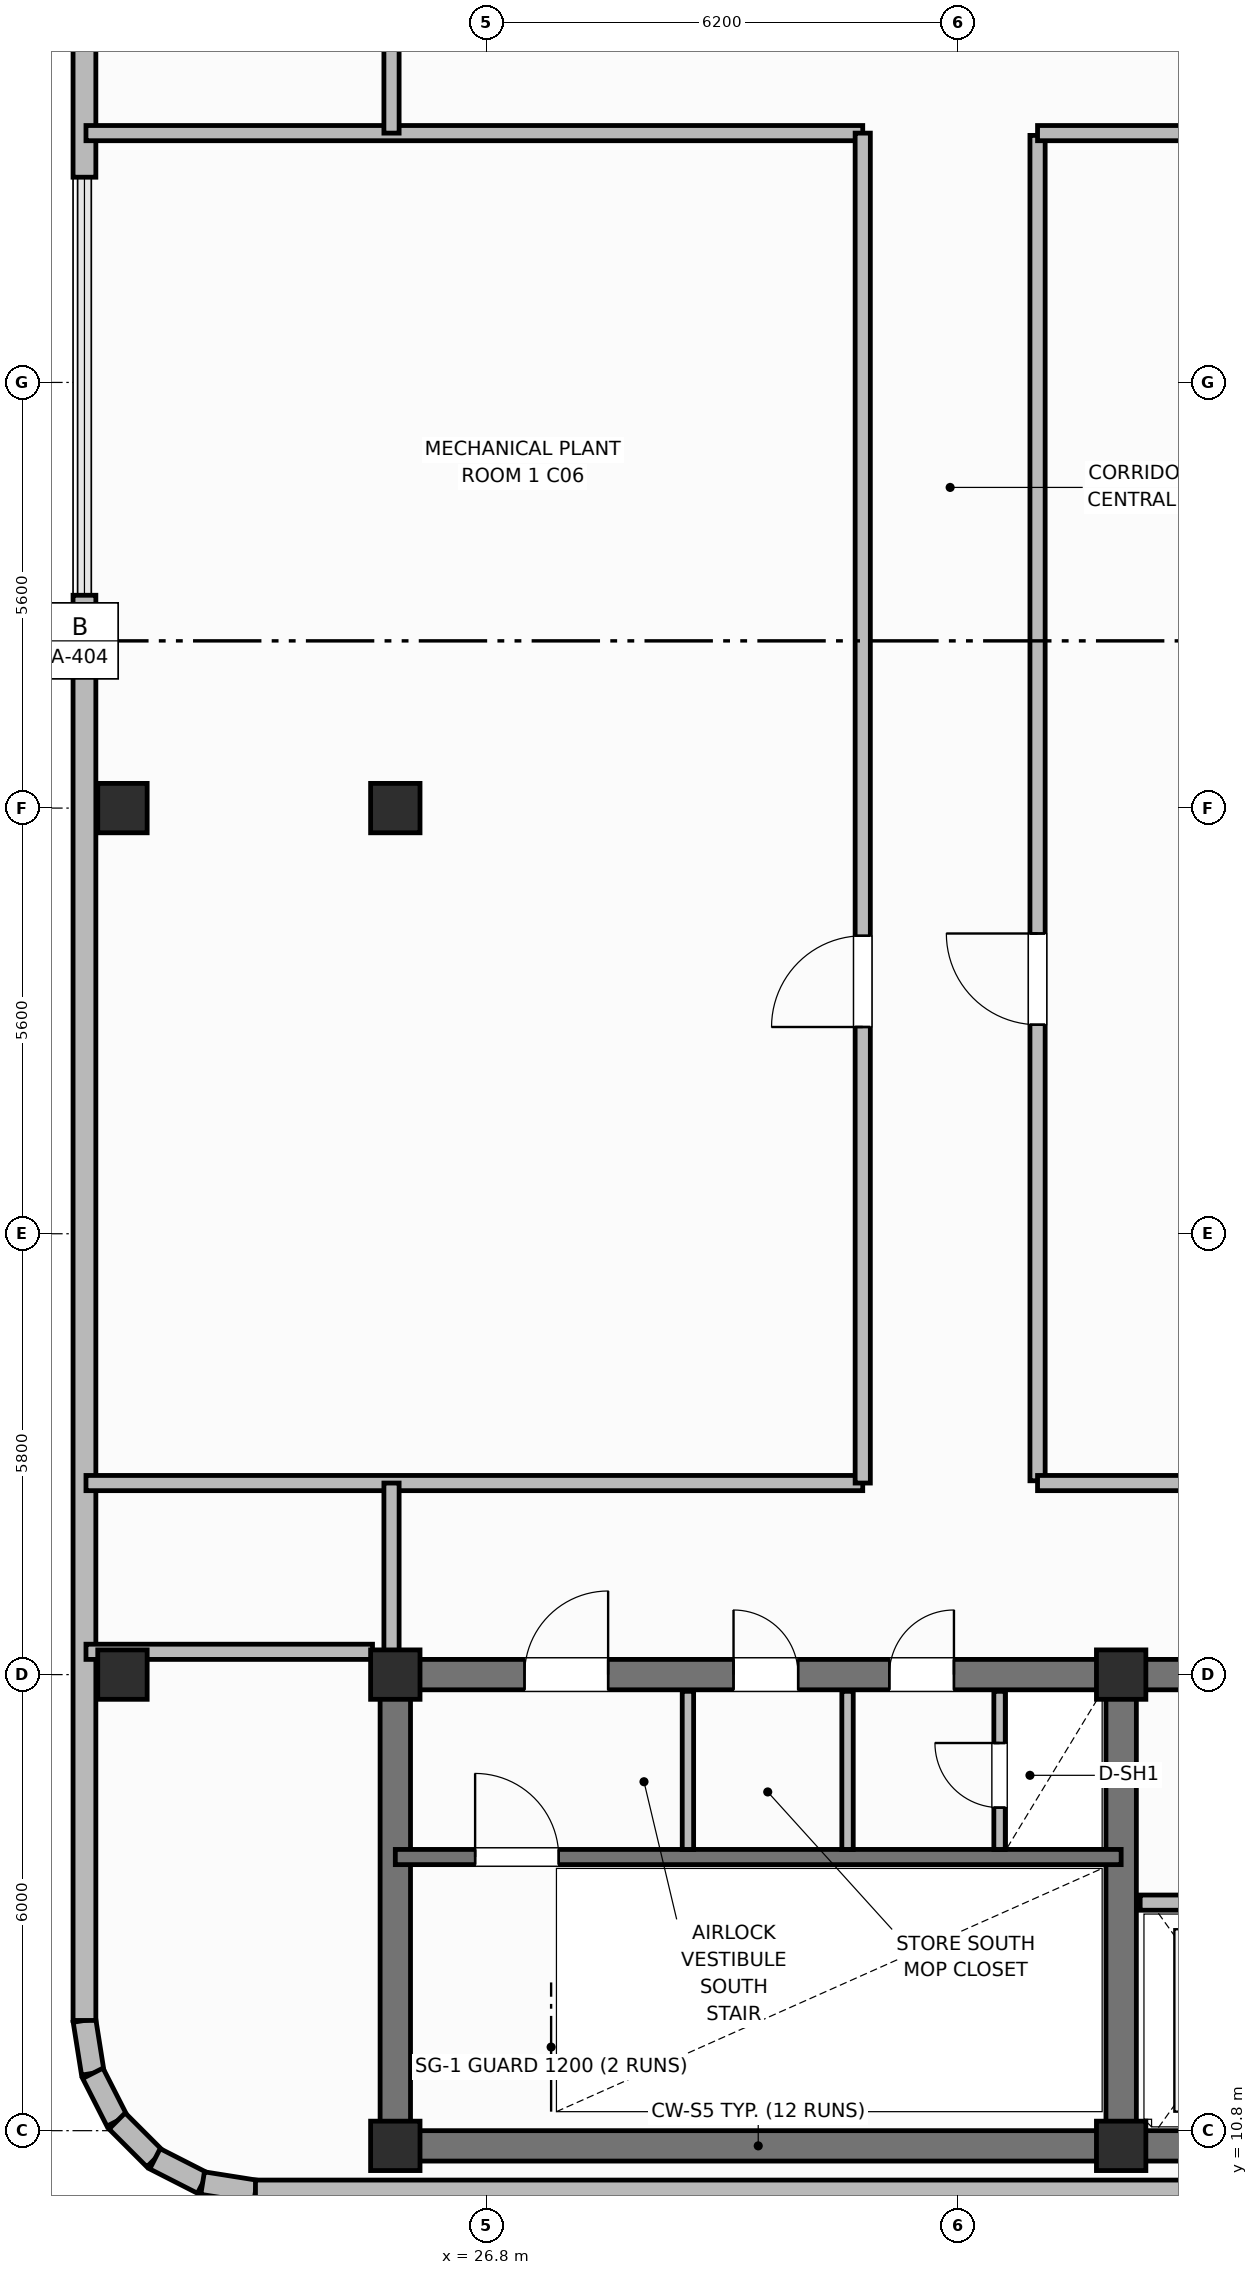
"""IFC4 building model, lengths in metres.
Left out: names, types, materials, properties, quantities, classifications, styles, units other than length and angle.
Written with IfcOpenShell. Run it as: python <this file> out.ifc"""

import sys

from ifc_helpers import new_model, si_unit, direction, frame, frame_2d, origin, origin_2d, place, context, subcontext, project, spatial, rectangle, extrude, element, fill, save


model = new_model("IFC4")
c1 = context("Model", 3, precision=1e-05, world=origin(), true_north=direction((0.0, 1.0)))
c2 = subcontext(c1, "Body", "Model", "MODEL_VIEW")
j1 = project(units=[si_unit("LENGTHUNIT", "METRE"), si_unit("PLANEANGLEUNIT", "RADIAN")], contexts=[c1])
p1 = place(None, origin())
s1 = spatial("IfcSite", under=j1, at=p1, CompositionType="ELEMENT")
p2 = place(p1, origin())
s2 = spatial("IfcBuilding", under=s1, at=p2, CompositionType="ELEMENT")
p3 = place(p2, frame((0.0, 0.0, 320.0)))
s3 = spatial("IfcBuildingStorey", under=s2, at=p3, CompositionType="ELEMENT", Elevation=320.0)
p4 = place(p3, frame((52.8, 10.6, 0.0), z_axis=(0.0, 0.0, 1.0), x_axis=(-1.0, 0.0, 0.0)))
e1 = element("IfcWall", 1, at=p4, inside=s3, PredefinedType="SHEAR", context=c2, shape_type="SweptSolid", body=[
    extrude(rectangle(XDim=27.2, YDim=0.4, at=frame_2d((13.6, 0.0))), origin(), (0.0, 0.0, 1.0), 3.6),
])
p5 = place(p3, frame((25.6, 10.8, 0.0), z_axis=(0.0, 0.0, 1.0), x_axis=(0.0, 1.0, 0.0)))
e2 = element("IfcWall", 2, at=p5, inside=s3, PredefinedType="SHEAR", context=c2, shape_type="SweptSolid", body=[
    extrude(rectangle(XDim=5.8, YDim=0.4, at=frame_2d((2.9, 0.0))), origin(), (0.0, 0.0, 1.0), 3.6),
])
p6 = place(p3, frame((25.6, 16.8, 0.0), z_axis=(0.0, 0.0, 1.0), x_axis=(1.0, 0.0, 0.0)))
e3 = element("IfcWall", 3, at=p6, inside=s3, PredefinedType="SHEAR", context=c2, shape_type="SweptSolid", body=[
    extrude(rectangle(XDim=27.2, YDim=0.4, at=frame_2d((13.6, 0.0))), origin(), (0.0, 0.0, 1.0), 3.6),
])
p7 = place(p6, frame((1.7, 0.0, 0.0)))
e4 = element("IfcOpeningElement", 4, at=p7, cuts=e3, PredefinedType="OPENING", context=c2, shape_type="SweptSolid", body=[
    extrude(rectangle(XDim=1.1, YDim=2.15, at=frame_2d((0.55, 1.075))), frame((0.0, 0.21, 0.0), z_axis=(0.0, -1.0, 0.0), x_axis=(1.0, 0.0, 0.0)), (0.0, 0.0, 1.0), 0.42),
])
p8 = place(p6, frame((4.45, 0.0, 0.0)))
e5 = element("IfcOpeningElement", 5, at=p8, cuts=e3, PredefinedType="OPENING", context=c2, shape_type="SweptSolid", body=[
    extrude(rectangle(XDim=0.85, YDim=2.1, at=frame_2d((0.425, 1.05))), frame((0.0, 0.21, 0.0), z_axis=(0.0, -1.0, 0.0), x_axis=(1.0, 0.0, 0.0)), (0.0, 0.0, 1.0), 0.42),
])
p9 = place(p6, frame((6.5, 0.0, 0.0)))
e6 = element("IfcOpeningElement", 6, at=p9, cuts=e3, PredefinedType="OPENING", context=c2, shape_type="SweptSolid", body=[
    extrude(rectangle(XDim=0.85, YDim=2.1, at=frame_2d((0.425, 1.05))), frame((0.0, 0.21, 0.0), z_axis=(0.0, -1.0, 0.0), x_axis=(1.0, 0.0, 0.0)), (0.0, 0.0, 1.0), 0.42),
])
p10 = place(p6, frame((13.0, 0.0, 0.0)))
e7 = element("IfcOpeningElement", 7, at=p10, cuts=e3, PredefinedType="OPENING", context=c2, shape_type="SweptSolid", body=[
    extrude(rectangle(XDim=1.2, YDim=2.15, at=frame_2d((0.6, 1.075))), frame((0.0, 0.21, 0.0), z_axis=(0.0, -1.0, 0.0), x_axis=(1.0, 0.0, 0.0)), (0.0, 0.0, 1.0), 0.42),
])
p11 = place(p6, frame((19.8, 0.0, 0.0)))
e8 = element("IfcOpeningElement", 8, at=p11, cuts=e3, PredefinedType="OPENING", context=c2, shape_type="SweptSolid", body=[
    extrude(rectangle(XDim=0.85, YDim=2.1, at=frame_2d((0.425, 1.05))), frame((0.0, 0.21, 0.0), z_axis=(0.0, -1.0, 0.0), x_axis=(1.0, 0.0, 0.0)), (0.0, 0.0, 1.0), 0.42),
])
p12 = place(p6, frame((24.2, 0.0, 0.0)))
e9 = element("IfcOpeningElement", 9, at=p12, cuts=e3, PredefinedType="OPENING", context=c2, shape_type="SweptSolid", body=[
    extrude(rectangle(XDim=0.85, YDim=2.1, at=frame_2d((0.425, 1.05))), frame((0.0, 0.21, 0.0), z_axis=(0.0, -1.0, 0.0), x_axis=(1.0, 0.0, 0.0)), (0.0, 0.0, 1.0), 0.42),
])
p13 = place(p3, frame((35.15, 10.8, 0.0), z_axis=(0.0, 0.0, 1.0), x_axis=(0.0, 1.0, 0.0)))
e10 = element("IfcWall", 10, at=p13, inside=s3, PredefinedType="SHEAR", context=c2, shape_type="SweptSolid", body=[
    extrude(rectangle(XDim=5.8, YDim=0.4, at=frame_2d((2.9, 0.0))), origin(), (0.0, 0.0, 1.0), 3.6),
])
for number, where, z_axis, x_axis in (
    (11, (25.6, 10.6, 0.0), (0.0, 0.0, 1.0), (1.0, 0.0, 0.0)),
    (12, (25.6, 16.8, 0.0), (0.0, 0.0, 1.0), (1.0, 0.0, 0.0)),
    (13, (35.15, 10.6, 0.0), (0.0, 0.0, 1.0), (1.0, 0.0, 0.0)),
    (14, (35.15, 16.8, 0.0), (0.0, 0.0, 1.0), (1.0, 0.0, 0.0)),
    (15, (25.6, 28.2, 0.0), (0.0, 0.0, 1.0), (1.0, 0.0, 0.0)),
    (16, (22.01, 16.8, 0.0), (0.0, 0.0, 1.0), (1.0, 0.0, 0.0)),
    (17, (22.01, 28.2, 0.0), (0.0, 0.0, 1.0), (1.0, 0.0, 0.0)),
):
    element("IfcColumn", number, at=place(p3, frame(where, z_axis=z_axis, x_axis=x_axis)), inside=s3, PredefinedType="COLUMN", context=c2, shape_type="SweptSolid", body=[
        extrude(rectangle(XDim=0.65, YDim=0.65, at=origin_2d()), origin(), (0.0, 0.0, 1.0), 3.6),
    ])
for number, where, z_axis, x_axis in (
    (18, (21.51, 12.25, 0.0), (0.0, 0.0, 1.0), (0.156, -0.988, 0.0)),
    (19, (21.62, 11.555, 0.0), (0.0, 0.0, 1.0), (0.454, -0.891, 0.0)),
):
    element("IfcWall", number, at=place(p3, frame(where, z_axis=z_axis, x_axis=x_axis)), inside=s3, PredefinedType="SOLIDWALL", context=c2, shape_type="SweptSolid", body=[
        extrude(rectangle(XDim=0.704, YDim=0.3, at=frame_2d((0.352, 0.0))), origin(), (0.0, 0.0, 1.0), 2.83),
    ])
p14 = place(p3, frame((21.94, 10.927, 0.0), z_axis=(0.0, 0.0, 1.0), x_axis=(0.707106781187, -0.707106781187, 0.0)))
e20 = element("IfcWall", 20, at=p14, inside=s3, PredefinedType="SOLIDWALL", context=c2, shape_type="SweptSolid", body=[
    extrude(rectangle(XDim=0.704, YDim=0.3, at=frame_2d((0.352, 0.0))), origin(), (0.0, 0.0, 1.0), 2.83),
])
for number, where, z_axis, x_axis in (
    (21, (22.438, 10.43, 0.0), (0.0, 0.0, 1.0), (0.891, -0.454, 0.0)),
    (22, (23.065, 10.11, 0.0), (0.0, 0.0, 1.0), (0.988, -0.156, 0.0)),
):
    element("IfcWall", number, at=place(p3, frame(where, z_axis=z_axis, x_axis=x_axis)), inside=s3, PredefinedType="SOLIDWALL", context=c2, shape_type="SweptSolid", body=[
        extrude(rectangle(XDim=0.704, YDim=0.3, at=frame_2d((0.352, 0.0))), origin(), (0.0, 0.0, 1.0), 2.83),
    ])
p15 = place(p3, frame((23.76, 10.0, 0.0), z_axis=(0.0, 0.0, 1.0), x_axis=(1.0, 0.0, 0.0)))
e23 = element("IfcWall", 23, at=p15, inside=s3, PredefinedType="SOLIDWALL", context=c2, shape_type="SweptSolid", body=[
    extrude(rectangle(XDim=30.88, YDim=0.3, at=frame_2d((15.44, 0.0))), origin(), (0.0, 0.0, 1.0), 2.83),
])
p16 = place(p3, frame((21.51, 44.15, 0.0), z_axis=(0.0, 0.0, 1.0), x_axis=(0.0, -1.0, 0.0)))
e24 = element("IfcWall", 24, at=p16, inside=s3, PredefinedType="SOLIDWALL", context=c2, shape_type="SweptSolid", body=[
    extrude(rectangle(XDim=7.65, YDim=0.3, at=frame_2d((3.825, 0.0))), origin(), (0.0, 0.0, 1.0), 2.83),
])
p17 = place(p3, frame((21.51, 31.0, 0.0), z_axis=(0.0, 0.0, 1.0), x_axis=(0.0, -1.0, 0.0)))
e25 = element("IfcWall", 25, at=p17, inside=s3, PredefinedType="SOLIDWALL", context=c2, shape_type="SweptSolid", body=[
    extrude(rectangle(XDim=18.75, YDim=0.3, at=frame_2d((9.375, 0.0))), origin(), (0.0, 0.0, 1.0), 2.83),
])
p18 = place(p3, frame((25.6, 14.4, 0.0), z_axis=(0.0, 0.0, 1.0), x_axis=(1.0, 0.0, 0.0)))
e26 = element("IfcWall", 26, at=p18, inside=s3, PredefinedType="SHEAR", context=c2, shape_type="SweptSolid", body=[
    extrude(rectangle(XDim=9.55, YDim=0.2, at=frame_2d((4.775, 0.0))), origin(), (0.0, 0.0, 1.0), 3.6),
])
p19 = place(p18, frame((1.05, 0.0, 0.0)))
e27 = element("IfcOpeningElement", 27, at=p19, cuts=e26, PredefinedType="OPENING", context=c2, shape_type="SweptSolid", body=[
    extrude(rectangle(XDim=1.1, YDim=2.15, at=frame_2d((0.55, 1.075))), frame((0.0, 0.11, 0.0), z_axis=(0.0, -1.0, 0.0), x_axis=(1.0, 0.0, 0.0)), (0.0, 0.0, 1.0), 0.22),
])
for number, where, z_axis, x_axis in (
    (28, (29.45, 14.5, 0.0), (0.0, 0.0, 1.0), (0.0, 1.0, 0.0)),
    (29, (31.55, 14.5, 0.0), (0.0, 0.0, 1.0), (0.0, 1.0, 0.0)),
):
    element("IfcWall", number, at=place(p3, frame(where, z_axis=z_axis, x_axis=x_axis)), inside=s3, PredefinedType="PARTITIONING", context=c2, shape_type="SweptSolid", body=[
        extrude(rectangle(XDim=2.08, YDim=0.15, at=frame_2d((1.04, 0.0))), origin(), (0.0, 0.0, 1.0), 2.53),
    ])
p20 = place(p3, frame((33.55, 14.5, 0.0), z_axis=(0.0, 0.0, 1.0), x_axis=(0.0, 1.0, 0.0)))
e30 = element("IfcWall", 30, at=p20, inside=s3, PredefinedType="PARTITIONING", context=c2, shape_type="SweptSolid", body=[
    extrude(rectangle(XDim=2.08, YDim=0.15, at=frame_2d((1.04, 0.0))), origin(), (0.0, 0.0, 1.0), 2.53),
])
p21 = place(p20, frame((0.55, 0.0, 0.0)))
e31 = element("IfcOpeningElement", 31, at=p21, cuts=e30, PredefinedType="OPENING", context=c2, shape_type="SweptSolid", body=[
    extrude(rectangle(XDim=0.85, YDim=2.05, at=frame_2d((0.425, 1.025))), frame((0.0, 0.085, 0.0), z_axis=(0.0, -1.0, 0.0), x_axis=(1.0, 0.0, 0.0)), (0.0, 0.0, 1.0), 0.17),
])
p22 = place(p3, frame((35.4, 13.8, 0.0), z_axis=(0.0, 0.0, 1.0), x_axis=(1.0, 0.0, 0.0)))
e32 = element("IfcWall", 32, at=p22, inside=s3, PredefinedType="PARTITIONING", context=c2, shape_type="SweptSolid", body=[
    extrude(rectangle(XDim=7.6, YDim=0.2, at=frame_2d((3.8, 0.0))), origin(), (0.0, 0.0, 1.0), 2.19),
])
p23 = place(p22, frame((0.7, 0.0, 0.0)))
e33 = element("IfcOpeningElement", 33, at=p23, cuts=e32, PredefinedType="OPENING", context=c2, shape_type="SweptSolid", body=[
    extrude(rectangle(XDim=1.1, YDim=2.15, at=frame_2d((0.55, 1.075))), frame((0.0, 0.11, 0.0), z_axis=(0.0, -1.0, 0.0), x_axis=(1.0, 0.0, 0.0)), (0.0, 0.0, 1.0), 0.22),
])
p24 = place(p22, frame((3.35, 0.0, 0.0)))
e34 = element("IfcOpeningElement", 34, at=p24, cuts=e32, PredefinedType="OPENING", context=c2, shape_type="SweptSolid", body=[
    extrude(rectangle(XDim=1.2, YDim=2.15, at=frame_2d((0.6, 1.075))), frame((0.0, 0.11, 0.0), z_axis=(0.0, -1.0, 0.0), x_axis=(1.0, 0.0, 0.0)), (0.0, 0.0, 1.0), 0.22),
])
for number, where, z_axis, x_axis in (
    (35, (21.53, 19.32, 0.0), (0.0, 0.0, 1.0), (1.0, 0.0, 0.0)),
    (36, (21.53, 37.08, 0.0), (0.0, 0.0, 1.0), (1.0, 0.0, 0.0)),
):
    element("IfcWall", number, at=place(p3, frame(where, z_axis=z_axis, x_axis=x_axis)), inside=s3, PredefinedType="PARTITIONING", context=c2, shape_type="SweptSolid", body=[
        extrude(rectangle(XDim=10.22, YDim=0.2, at=frame_2d((5.11, 0.0))), origin(), (0.0, 0.0, 1.0), 2.53),
    ])
p25 = place(p3, frame((31.75, 19.32, 0.0), z_axis=(0.0, 0.0, 1.0), x_axis=(0.0, 1.0, 0.0)))
e37 = element("IfcWall", 37, at=p25, inside=s3, PredefinedType="PARTITIONING", context=c2, shape_type="SweptSolid", body=[
    extrude(rectangle(XDim=17.76, YDim=0.2, at=frame_2d((8.88, 0.0))), origin(), (0.0, 0.0, 1.0), 2.53),
])
p26 = place(p25, frame((6.0, 0.0, 0.0)))
e38 = element("IfcOpeningElement", 38, at=p26, cuts=e37, PredefinedType="OPENING", context=c2, shape_type="SweptSolid", body=[
    extrude(rectangle(XDim=1.2, YDim=2.15, at=frame_2d((0.6, 1.075))), frame((0.0, 0.11, 0.0), z_axis=(0.0, -1.0, 0.0), x_axis=(1.0, 0.0, 0.0)), (0.0, 0.0, 1.0), 0.22),
])
p27 = place(p3, frame((34.05, 19.35, 0.0), z_axis=(0.0, 0.0, 1.0), x_axis=(0.0, 1.0, 0.0)))
e39 = element("IfcWall", 39, at=p27, inside=s3, PredefinedType="PARTITIONING", context=c2, shape_type="SweptSolid", body=[
    extrude(rectangle(XDim=17.7, YDim=0.2, at=frame_2d((8.85, 0.0))), origin(), (0.0, 0.0, 1.0), 2.53),
])
p28 = place(p27, frame((6.0, 0.0, 0.0)))
e40 = element("IfcOpeningElement", 40, at=p28, cuts=e39, PredefinedType="OPENING", context=c2, shape_type="SweptSolid", body=[
    extrude(rectangle(XDim=1.2, YDim=2.15, at=frame_2d((0.6, 1.075))), frame((0.0, 0.11, 0.0), z_axis=(0.0, -1.0, 0.0), x_axis=(1.0, 0.0, 0.0)), (0.0, 0.0, 1.0), 0.22),
])
p29 = place(p3, frame((34.05, 19.32, 0.0), z_axis=(0.0, 0.0, 1.0), x_axis=(1.0, 0.0, 0.0)))
e41 = element("IfcWall", 41, at=p29, inside=s3, PredefinedType="PARTITIONING", context=c2, shape_type="SweptSolid", body=[
    extrude(rectangle(XDim=22.82, YDim=0.2, at=frame_2d((11.41, 0.0))), origin(), (0.0, 0.0, 1.0), 2.53),
])
p30 = place(p29, frame((14.75, 0.0, 0.0)))
e42 = element("IfcOpeningElement", 42, at=p30, cuts=e41, PredefinedType="OPENING", context=c2, shape_type="SweptSolid", body=[
    extrude(rectangle(XDim=1.2, YDim=2.15, at=frame_2d((0.6, 1.075))), frame((0.0, 0.11, 0.0), z_axis=(0.0, -1.0, 0.0), x_axis=(1.0, 0.0, 0.0)), (0.0, 0.0, 1.0), 0.22),
])
p31 = place(p3, frame((56.87, 37.08, 0.0), z_axis=(0.0, 0.0, 1.0), x_axis=(-1.0, 0.0, 0.0)))
e43 = element("IfcWall", 43, at=p31, inside=s3, PredefinedType="PARTITIONING", context=c2, shape_type="SweptSolid", body=[
    extrude(rectangle(XDim=22.82, YDim=0.2, at=frame_2d((11.41, 0.0))), origin(), (0.0, 0.0, 1.0), 2.53),
])
p32 = place(p31, frame((6.87, 0.0, 0.0)))
e44 = element("IfcOpeningElement", 44, at=p32, cuts=e43, PredefinedType="OPENING", context=c2, shape_type="SweptSolid", body=[
    extrude(rectangle(XDim=1.2, YDim=2.15, at=frame_2d((0.6, 1.075))), frame((0.0, 0.11, 0.0), z_axis=(0.0, -1.0, 0.0), x_axis=(1.0, 0.0, 0.0)), (0.0, 0.0, 1.0), 0.22),
])
p33 = place(p3, frame((25.55, 16.95, 0.0), z_axis=(0.0, 0.0, 1.0), x_axis=(0.0, 1.0, 0.0)))
e45 = element("IfcWall", 45, at=p33, inside=s3, PredefinedType="PARTITIONING", context=c2, shape_type="SweptSolid", body=[
    extrude(rectangle(XDim=2.37, YDim=0.2, at=frame_2d((1.185, 0.0))), origin(), (0.0, 0.0, 1.0), 2.53),
])
p34 = place(p3, frame((25.55, 37.08, 0.0), z_axis=(0.0, 0.0, 1.0), x_axis=(0.0, 1.0, 0.0)))
e46 = element("IfcWall", 46, at=p34, inside=s3, PredefinedType="PARTITIONING", context=c2, shape_type="SweptSolid", body=[
    extrude(rectangle(XDim=2.37, YDim=0.2, at=frame_2d((1.185, 0.0))), origin(), (0.0, 0.0, 1.0), 2.53),
])
p35 = place(p3, frame((21.53, 17.1, 0.0), z_axis=(0.0, 0.0, 1.0), x_axis=(1.0, 0.0, 0.0)))
e47 = element("IfcWall", 47, at=p35, inside=s3, PredefinedType="PARTITIONING", context=c2, shape_type="SweptSolid", body=[
    extrude(rectangle(XDim=3.77, YDim=0.2, at=frame_2d((1.885, 0.0))), origin(), (0.0, 0.0, 1.0), 2.53),
])
p36 = place(p19, origin())
e48 = element("IfcDoor", 48, at=p36, inside=s3, OperationType="SINGLE_SWING_LEFT", PredefinedType="DOOR", context=c2, shape_type="SweptSolid", body=[
    extrude(rectangle(XDim=1.1, YDim=2.15, at=frame_2d((0.55, 1.075))), frame((0.0, 0.025, 0.0), z_axis=(0.0, -1.0, 0.0), x_axis=(1.0, 0.0, 0.0)), (0.0, 0.0, 1.0), 0.05),
])
fill(e27, e48)
p37 = place(p21, origin())
e49 = element("IfcDoor", 49, at=p37, inside=s3, OperationType="SINGLE_SWING_RIGHT", PredefinedType="TRAPDOOR", context=c2, shape_type="SweptSolid", body=[
    extrude(rectangle(XDim=0.85, YDim=2.05, at=frame_2d((0.425, 1.025))), frame((0.0, 0.025, 0.0), z_axis=(0.0, -1.0, 0.0), x_axis=(1.0, 0.0, 0.0)), (0.0, 0.0, 1.0), 0.05),
])
fill(e31, e49)
p38 = place(p26, origin())
e50 = element("IfcDoor", 50, at=p38, inside=s3, OperationType="SINGLE_SWING_LEFT", PredefinedType="DOOR", context=c2, shape_type="SweptSolid", body=[
    extrude(rectangle(XDim=1.2, YDim=2.15, at=frame_2d((0.6, 1.075))), frame((0.0, 0.025, 0.0), z_axis=(0.0, -1.0, 0.0), x_axis=(1.0, 0.0, 0.0)), (0.0, 0.0, 1.0), 0.05),
])
fill(e38, e50)
p39 = place(p28, origin())
e51 = element("IfcDoor", 51, at=p39, inside=s3, OperationType="SINGLE_SWING_RIGHT", PredefinedType="DOOR", context=c2, shape_type="SweptSolid", body=[
    extrude(rectangle(XDim=1.2, YDim=2.15, at=frame_2d((0.6, 1.075))), frame((0.0, 0.025, 0.0), z_axis=(0.0, -1.0, 0.0), x_axis=(1.0, 0.0, 0.0)), (0.0, 0.0, 1.0), 0.05),
])
fill(e40, e51)
p40 = place(p7, origin())
e52 = element("IfcDoor", 52, at=p40, inside=s3, OperationType="SINGLE_SWING_RIGHT", PredefinedType="DOOR", context=c2, shape_type="SweptSolid", body=[
    extrude(rectangle(XDim=1.1, YDim=2.15, at=frame_2d((0.55, 1.075))), frame((0.0, 0.025, 0.0), z_axis=(0.0, -1.0, 0.0), x_axis=(1.0, 0.0, 0.0)), (0.0, 0.0, 1.0), 0.05),
])
fill(e4, e52)
p41 = place(p8, origin())
e53 = element("IfcDoor", 53, at=p41, inside=s3, OperationType="SINGLE_SWING_LEFT", PredefinedType="DOOR", context=c2, shape_type="SweptSolid", body=[
    extrude(rectangle(XDim=0.85, YDim=2.1, at=frame_2d((0.425, 1.05))), frame((0.0, 0.025, 0.0), z_axis=(0.0, -1.0, 0.0), x_axis=(1.0, 0.0, 0.0)), (0.0, 0.0, 1.0), 0.05),
])
fill(e5, e53)
p42 = place(p9, origin())
e54 = element("IfcDoor", 54, at=p42, inside=s3, OperationType="SINGLE_SWING_RIGHT", PredefinedType="DOOR", context=c2, shape_type="SweptSolid", body=[
    extrude(rectangle(XDim=0.85, YDim=2.1, at=frame_2d((0.425, 1.05))), frame((0.0, 0.025, 0.0), z_axis=(0.0, -1.0, 0.0), x_axis=(1.0, 0.0, 0.0)), (0.0, 0.0, 1.0), 0.05),
])
fill(e6, e54)
save(model, sys.argv[1])
